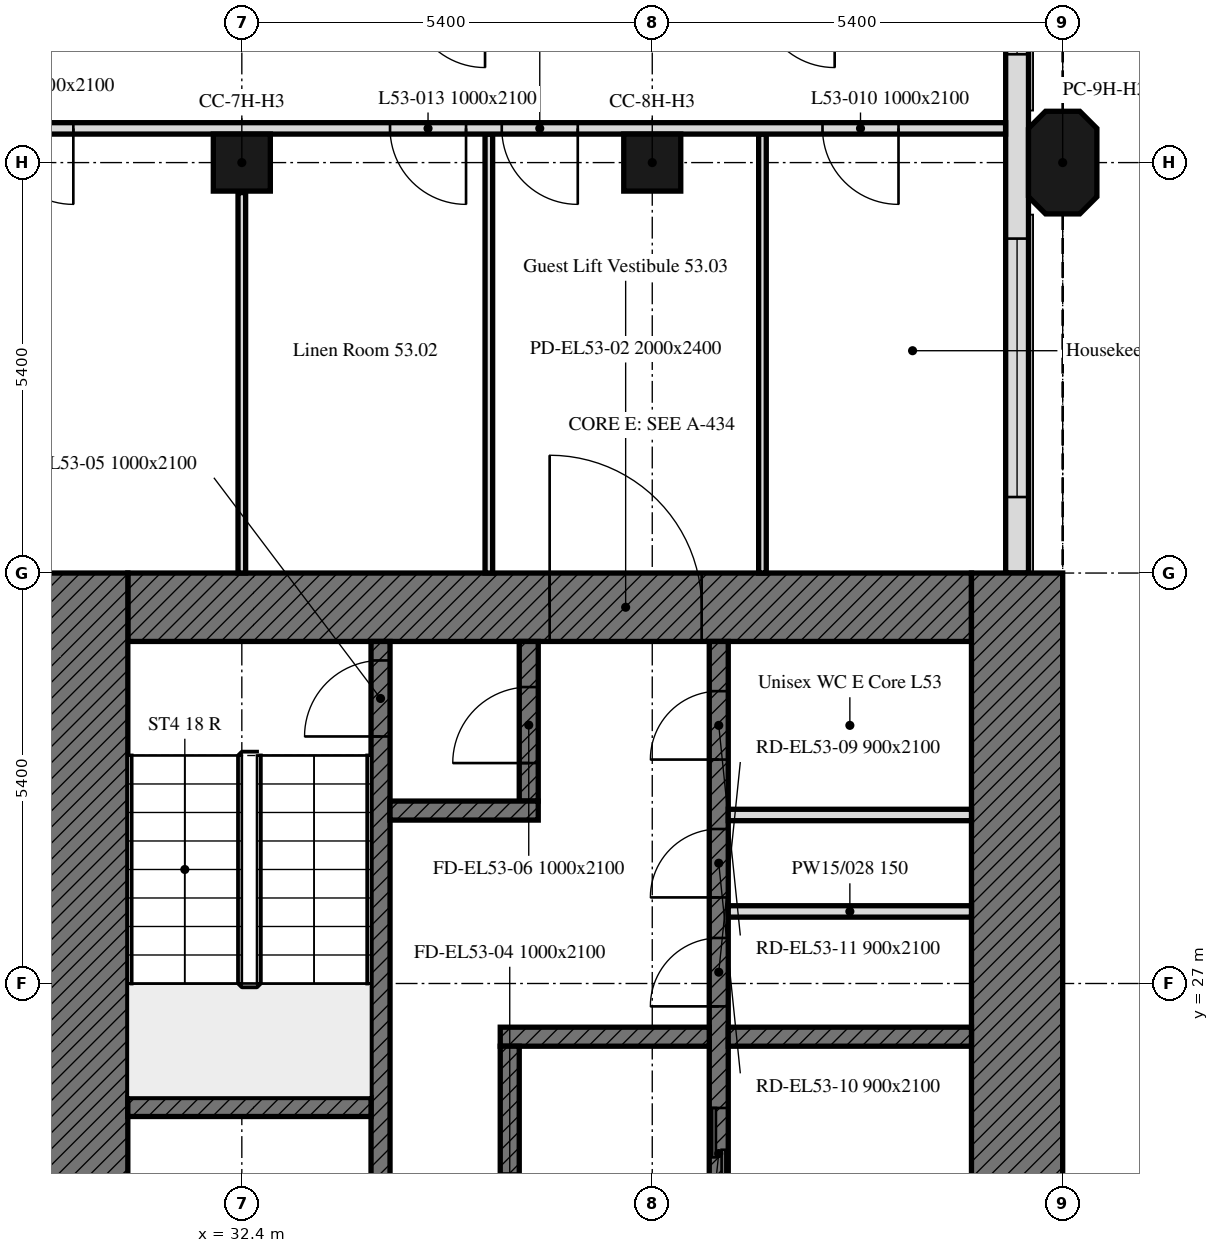
"""IFC4 building model, lengths in metres.
Left out: names, types, materials, properties, quantities, classifications, styles, units other than length and angle.
Written with IfcOpenShell. Run it as: python <this file> out.ifc"""

import sys

from ifc_helpers import new_model, si_unit, direction, frame, frame_2d, origin, origin_2d, place, context, subcontext, project, spatial, polyline, rectangle, outline, extrude, element, fill, save


model = new_model("IFC4")
c1 = context("Model", 3, precision=1e-05, world=origin(), true_north=direction((0.0, 1.0)))
c2 = subcontext(c1, "Body", "Model", "MODEL_VIEW")
j1 = project(units=[si_unit("LENGTHUNIT", "METRE"), si_unit("PLANEANGLEUNIT", "RADIAN")], contexts=[c1])
p1 = place(None, origin())
s1 = spatial("IfcSite", under=j1, at=p1, CompositionType="ELEMENT")
p2 = place(p1, origin())
s2 = spatial("IfcBuilding", under=s1, at=p2, CompositionType="ELEMENT")
p3 = place(p2, frame((0.0, 0.0, 213.7)))
s3 = spatial("IfcBuildingStorey", under=s2, at=p3, CompositionType="ELEMENT", Elevation=213.7)
for number, where, z_axis, x_axis in (
    (1, (32.4, 37.8, 0.0), (0.0, 0.0, 1.0), (1.0, 0.0, 0.0)),
    (2, (37.8, 37.8, 0.0), (0.0, 0.0, 1.0), (1.0, 0.0, 0.0)),
):
    element("IfcColumn", number, at=place(p3, frame(where, z_axis=z_axis, x_axis=x_axis)), inside=s3, PredefinedType="COLUMN", context=c2, shape_type="SweptSolid", body=[
        extrude(rectangle(XDim=0.75, YDim=0.75, at=origin_2d()), origin(), (0.0, 0.0, 1.0), 3.0),
    ])
p4 = place(p3, frame((43.2, 37.8, 0.0), z_axis=(0.0, 0.0, 1.0), x_axis=(0.0, 1.0, 0.0)))
e3 = element("IfcColumn", 3, at=p4, inside=s3, PredefinedType="COLUMN", context=c2, shape_type="SweptSolid", body=[
    extrude(outline(polyline([(-0.45, -0.45), (0.45, -0.45), (0.675, -0.225), (0.675, 0.225), (0.45, 0.45), (-0.45, 0.45), (-0.675, 0.225), (-0.675, -0.225), (-0.45, -0.45)])), origin(), (0.0, 0.0, 1.0), 3.0),
])
p5 = place(p3, frame((42.6, 32.4, 0.0), z_axis=(0.0, 0.0, 1.0), x_axis=(0.0, 1.0, 0.0)))
e4 = element("IfcWall", 4, at=p5, inside=s3, PredefinedType="SOLIDWALL", context=c2, shape_type="SweptSolid", body=[
    extrude(rectangle(XDim=10.614, YDim=0.3, at=frame_2d((5.307, 0.0))), origin(), (0.0, 0.0, 1.0), 3.0),
])
p6 = place(p5, frame((1.0, 0.0, 0.9)))
e5 = element("IfcOpeningElement", 5, at=p6, cuts=e4, PredefinedType="OPENING", context=c2, shape_type="SweptSolid", body=[
    extrude(rectangle(XDim=3.4, YDim=1.7, at=frame_2d((1.7, 0.85))), frame((0.0, 0.16, 0.0), z_axis=(0.0, -1.0, 0.0), x_axis=(1.0, 0.0, 0.0)), (0.0, 0.0, 1.0), 0.32),
])
p7 = place(p5, frame((6.825, 0.0, 0.9)))
e6 = element("IfcOpeningElement", 6, at=p7, cuts=e4, PredefinedType="OPENING", context=c2, shape_type="SweptSolid", body=[
    extrude(rectangle(XDim=0.65, YDim=1.7, at=frame_2d((0.325, 0.85))), frame((0.0, 0.16, 0.0), z_axis=(0.0, -1.0, 0.0), x_axis=(1.0, 0.0, 0.0)), (0.0, 0.0, 1.0), 0.32),
])
p8 = place(p5, frame((8.35, 0.0, 0.9)))
e7 = element("IfcOpeningElement", 7, at=p8, cuts=e4, PredefinedType="OPENING", context=c2, shape_type="SweptSolid", body=[
    extrude(rectangle(XDim=1.1, YDim=1.7, at=frame_2d((0.55, 0.85))), frame((0.0, 0.16, 0.0), z_axis=(0.0, -1.0, 0.0), x_axis=(1.0, 0.0, 0.0)), (0.0, 0.0, 1.0), 0.32),
])
p9 = place(p3, frame((30.9, 31.95, 0.0), z_axis=(0.0, 0.0, 1.0), x_axis=(1.0, 0.0, 0.0)))
e8 = element("IfcWall", 8, at=p9, inside=s3, PredefinedType="SOLIDWALL", context=c2, shape_type="SweptSolid", body=[
    extrude(rectangle(XDim=11.1, YDim=0.9, at=frame_2d((5.55, 0.0))), origin(), (0.0, 0.0, 1.0), 3.0),
])
p10 = place(p9, frame((5.55, 0.0, 0.0)))
e9 = element("IfcOpeningElement", 9, at=p10, cuts=e8, PredefinedType="OPENING", context=c2, shape_type="SweptSolid", body=[
    extrude(rectangle(XDim=2.0, YDim=2.4, at=frame_2d((1.0, 1.2))), frame((0.0, 0.45, 0.0), z_axis=(0.0, -1.0, 0.0), x_axis=(1.0, 0.0, 0.0)), (0.0, 0.0, 1.0), 0.9),
])
for number, where, z_axis, x_axis in (
    (10, (42.6, 32.4, 0.0), (0.0, 0.0, 1.0), (0.0, -1.0, 0.0)),
    (11, (30.3, 16.2, 0.0), (0.0, 0.0, 1.0), (0.0, 1.0, 0.0)),
):
    element("IfcWall", number, at=place(p3, frame(where, z_axis=z_axis, x_axis=x_axis)), inside=s3, PredefinedType="SOLIDWALL", context=c2, shape_type="SweptSolid", body=[
        extrude(rectangle(XDim=16.2, YDim=1.2, at=frame_2d((8.1, 0.0))), origin(), (0.0, 0.0, 1.0), 3.0),
    ])
p11 = place(p3, frame((38.675, 17.1, 0.0), z_axis=(0.0, 0.0, 1.0), x_axis=(0.0, 1.0, 0.0)))
e12 = element("IfcWall", 12, at=p11, inside=s3, PredefinedType="SOLIDWALL", context=c2, shape_type="SweptSolid", body=[
    extrude(rectangle(XDim=14.4, YDim=0.25, at=frame_2d((7.2, 0.0))), origin(), (0.0, 0.0, 1.0), 3.0),
])
p12 = place(p11, frame((4.6, 0.0, 0.0)))
e13 = element("IfcOpeningElement", 13, at=p12, cuts=e12, PredefinedType="OPENING", context=c2, shape_type="SweptSolid", body=[
    extrude(rectangle(XDim=1.0, YDim=2.1, at=frame_2d((0.5, 1.05))), frame((0.0, 0.125, 0.0), z_axis=(0.0, -1.0, 0.0), x_axis=(1.0, 0.0, 0.0)), (0.0, 0.0, 1.0), 0.25),
])
p13 = place(p11, frame((7.062, 0.0, 0.0)))
e14 = element("IfcOpeningElement", 14, at=p13, cuts=e12, PredefinedType="OPENING", context=c2, shape_type="SweptSolid", body=[
    extrude(rectangle(XDim=1.2, YDim=2.1, at=frame_2d((0.6, 1.05))), frame((0.0, 0.125, 0.0), z_axis=(0.0, -1.0, 0.0), x_axis=(1.0, 0.0, 0.0)), (0.0, 0.0, 1.0), 0.25),
])
p14 = place(p11, frame((9.599, 0.0, 0.0)))
e15 = element("IfcOpeningElement", 15, at=p14, cuts=e12, PredefinedType="OPENING", context=c2, shape_type="SweptSolid", body=[
    extrude(rectangle(XDim=0.9, YDim=2.1, at=frame_2d((0.45, 1.05))), frame((0.0, 0.125, 0.0), z_axis=(0.0, -1.0, 0.0), x_axis=(1.0, 0.0, 0.0)), (0.0, 0.0, 1.0), 0.25),
])
p15 = place(p11, frame((11.032, 0.0, 0.0)))
e16 = element("IfcOpeningElement", 16, at=p15, cuts=e12, PredefinedType="OPENING", context=c2, shape_type="SweptSolid", body=[
    extrude(rectangle(XDim=0.9, YDim=2.1, at=frame_2d((0.45, 1.05))), frame((0.0, 0.125, 0.0), z_axis=(0.0, -1.0, 0.0), x_axis=(1.0, 0.0, 0.0)), (0.0, 0.0, 1.0), 0.25),
])
p16 = place(p11, frame((12.846, 0.0, 0.0)))
e17 = element("IfcOpeningElement", 17, at=p16, cuts=e12, PredefinedType="OPENING", context=c2, shape_type="SweptSolid", body=[
    extrude(rectangle(XDim=0.9, YDim=2.1, at=frame_2d((0.45, 1.05))), frame((0.0, 0.125, 0.0), z_axis=(0.0, -1.0, 0.0), x_axis=(1.0, 0.0, 0.0)), (0.0, 0.0, 1.0), 0.25),
])
p17 = place(p3, frame((34.225, 17.1, 0.0), z_axis=(0.0, 0.0, 1.0), x_axis=(0.0, 1.0, 0.0)))
e18 = element("IfcWall", 18, at=p17, inside=s3, PredefinedType="SOLIDWALL", context=c2, shape_type="SweptSolid", body=[
    extrude(rectangle(XDim=14.4, YDim=0.25, at=frame_2d((7.2, 0.0))), origin(), (0.0, 0.0, 1.0), 3.0),
])
p18 = place(p17, frame((13.15, 0.0, 0.0)))
e19 = element("IfcOpeningElement", 19, at=p18, cuts=e18, PredefinedType="OPENING", context=c2, shape_type="SweptSolid", body=[
    extrude(rectangle(XDim=1.0, YDim=2.1, at=frame_2d((0.5, 1.05))), frame((0.0, 0.125, 0.0), z_axis=(0.0, -1.0, 0.0), x_axis=(1.0, 0.0, 0.0)), (0.0, 0.0, 1.0), 0.25),
])
p19 = place(p17, frame((0.6, 0.0, 0.0)))
e20 = element("IfcOpeningElement", 20, at=p19, cuts=e18, PredefinedType="OPENING", context=c2, shape_type="SweptSolid", body=[
    extrude(rectangle(XDim=1.1, YDim=2.1, at=frame_2d((0.55, 1.05))), frame((0.0, 0.125, 0.0), z_axis=(0.0, -1.0, 0.0), x_axis=(1.0, 0.0, 0.0)), (0.0, 0.0, 1.0), 0.25),
])
p20 = place(p17, frame((3.25, 0.0, 0.0)))
e21 = element("IfcOpeningElement", 21, at=p20, cuts=e18, PredefinedType="OPENING", context=c2, shape_type="SweptSolid", body=[
    extrude(rectangle(XDim=0.9, YDim=2.1, at=frame_2d((0.45, 1.05))), frame((0.0, 0.125, 0.0), z_axis=(0.0, -1.0, 0.0), x_axis=(1.0, 0.0, 0.0)), (0.0, 0.0, 1.0), 0.25),
])
p21 = place(p3, frame((30.9, 25.375, 0.0), z_axis=(0.0, 0.0, 1.0), x_axis=(1.0, 0.0, 0.0)))
e22 = element("IfcWall", 22, at=p21, inside=s3, PredefinedType="SOLIDWALL", context=c2, shape_type="SweptSolid", body=[
    extrude(rectangle(XDim=3.2, YDim=0.25, at=frame_2d((1.6, 0.0))), origin(), (0.0, 0.0, 1.0), 3.0),
])
p22 = place(p3, frame((38.8, 26.3, 0.0), z_axis=(0.0, 0.0, 1.0), x_axis=(1.0, 0.0, 0.0)))
e23 = element("IfcWall", 23, at=p22, inside=s3, PredefinedType="SOLIDWALL", context=c2, shape_type="SweptSolid", body=[
    extrude(rectangle(XDim=3.2, YDim=0.25, at=frame_2d((1.6, 0.0))), origin(), (0.0, 0.0, 1.0), 3.0),
])
p23 = place(p3, frame((35.8, 26.3, 0.0), z_axis=(0.0, 0.0, 1.0), x_axis=(1.0, 0.0, 0.0)))
e24 = element("IfcWall", 24, at=p23, inside=s3, PredefinedType="SOLIDWALL", context=c2, shape_type="SweptSolid", body=[
    extrude(rectangle(XDim=2.75, YDim=0.25, at=frame_2d((1.375, 0.0))), origin(), (0.0, 0.0, 1.0), 3.0),
])
p24 = place(p3, frame((36.175, 29.4, 0.0), z_axis=(0.0, 0.0, 1.0), x_axis=(0.0, 1.0, 0.0)))
e25 = element("IfcWall", 25, at=p24, inside=s3, PredefinedType="SOLIDWALL", context=c2, shape_type="SweptSolid", body=[
    extrude(rectangle(XDim=2.1, YDim=0.25, at=frame_2d((1.05, 0.0))), origin(), (0.0, 0.0, 1.0), 3.0),
])
p25 = place(p24, frame((0.5, 0.0, 0.0)))
e26 = element("IfcOpeningElement", 26, at=p25, cuts=e25, PredefinedType="OPENING", context=c2, shape_type="SweptSolid", body=[
    extrude(rectangle(XDim=1.0, YDim=2.1, at=frame_2d((0.5, 1.05))), frame((0.0, 0.125, 0.0), z_axis=(0.0, -1.0, 0.0), x_axis=(1.0, 0.0, 0.0)), (0.0, 0.0, 1.0), 0.25),
])
p26 = place(p3, frame((34.35, 29.275, 0.0), z_axis=(0.0, 0.0, 1.0), x_axis=(1.0, 0.0, 0.0)))
e27 = element("IfcWall", 27, at=p26, inside=s3, PredefinedType="SOLIDWALL", context=c2, shape_type="SweptSolid", body=[
    extrude(rectangle(XDim=1.95, YDim=0.25, at=frame_2d((0.975, 0.0))), origin(), (0.0, 0.0, 1.0), 3.0),
])
p27 = place(p3, frame((35.925, 20.55, 0.0), z_axis=(0.0, 0.0, 1.0), x_axis=(0.0, 1.0, 0.0)))
e28 = element("IfcWall", 28, at=p27, inside=s3, PredefinedType="SOLIDWALL", context=c2, shape_type="SweptSolid", body=[
    extrude(rectangle(XDim=5.625, YDim=0.25, at=frame_2d((2.812, 0.0))), origin(), (0.0, 0.0, 1.0), 3.0),
])
p28 = place(p27, frame((2.95, 0.0, 0.0)))
e29 = element("IfcOpeningElement", 29, at=p28, cuts=e28, PredefinedType="OPENING", context=c2, shape_type="SweptSolid", body=[
    extrude(rectangle(XDim=1.0, YDim=2.1, at=frame_2d((0.5, 1.05))), frame((0.0, 0.125, 0.0), z_axis=(0.0, -1.0, 0.0), x_axis=(1.0, 0.0, 0.0)), (0.0, 0.0, 1.0), 0.25),
])
for number, where, z_axis, x_axis in (
    (30, (38.8, 27.948, 0.0), (0.0, 0.0, 1.0), (1.0, 0.0, 0.0)),
    (31, (38.8, 29.217, 0.0), (0.0, 0.0, 1.0), (1.0, 0.0, 0.0)),
):
    element("IfcWall", number, at=place(p3, frame(where, z_axis=z_axis, x_axis=x_axis)), inside=s3, PredefinedType="PARTITIONING", context=c2, shape_type="SweptSolid", body=[
        extrude(rectangle(XDim=3.2, YDim=0.15, at=frame_2d((1.6, 0.0))), origin(), (0.0, 0.0, 1.0), 3.0),
    ])
p29 = place(p3, frame((32.4, 32.4, 0.0), z_axis=(0.0, 0.0, 1.0), x_axis=(0.0, 1.0, 0.0)))
e32 = element("IfcWall", 32, at=p29, inside=s3, PredefinedType="PARTITIONING", context=c2, shape_type="SweptSolid", body=[
    extrude(rectangle(XDim=5.005, YDim=0.1, at=frame_2d((2.502, 0.0))), origin(), (0.0, 0.0, 1.0), 2.4),
])
for number, where, z_axis, x_axis in (
    (33, (39.25, 32.4, 0.0), (0.0, 0.0, 1.0), (0.0, 1.0, 0.0)),
    (34, (35.65, 38.175, 0.0), (0.0, 0.0, 1.0), (0.0, -1.0, 0.0)),
):
    element("IfcWall", number, at=place(p3, frame(where, z_axis=z_axis, x_axis=x_axis)), inside=s3, PredefinedType="PARTITIONING", context=c2, shape_type="SweptSolid", body=[
        extrude(rectangle(XDim=5.775, YDim=0.1, at=frame_2d((2.888, 0.0))), origin(), (0.0, 0.0, 1.0), 3.0),
    ])
p30 = place(p3, frame((42.449, 38.25, 0.0), z_axis=(0.0, 0.0, 1.0), x_axis=(-1.0, 0.0, 0.0)))
e35 = element("IfcWall", 35, at=p30, inside=s3, PredefinedType="PARTITIONING", context=c2, shape_type="SweptSolid", body=[
    extrude(rectangle(XDim=37.049, YDim=0.15, at=frame_2d((18.524, 0.0))), origin(), (0.0, 0.0, 1.0), 2.4),
])
p31 = place(p30, frame((12.266, 0.0, 0.0)))
e36 = element("IfcOpeningElement", 36, at=p31, cuts=e35, PredefinedType="OPENING", context=c2, shape_type="SweptSolid", body=[
    extrude(rectangle(XDim=1.0, YDim=2.1, at=frame_2d((0.5, 1.05))), frame((0.0, 0.075, 0.0), z_axis=(0.0, -1.0, 0.0), x_axis=(1.0, 0.0, 0.0)), (0.0, 0.0, 1.0), 0.15),
])
p32 = place(p30, frame((23.049, 0.0, 0.0)))
e37 = element("IfcOpeningElement", 37, at=p32, cuts=e35, PredefinedType="OPENING", context=c2, shape_type="SweptSolid", body=[
    extrude(rectangle(XDim=1.0, YDim=2.1, at=frame_2d((0.5, 1.05))), frame((0.0, 0.075, 0.0), z_axis=(0.0, -1.0, 0.0), x_axis=(1.0, 0.0, 0.0)), (0.0, 0.0, 1.0), 0.15),
])
p33 = place(p30, frame((1.409, 0.0, 0.0)))
e38 = element("IfcOpeningElement", 38, at=p33, cuts=e35, PredefinedType="OPENING", context=c2, shape_type="SweptSolid", body=[
    extrude(rectangle(XDim=1.0, YDim=2.1, at=frame_2d((0.5, 1.05))), frame((0.0, 0.075, 0.0), z_axis=(0.0, -1.0, 0.0), x_axis=(1.0, 0.0, 0.0)), (0.0, 0.0, 1.0), 0.15),
])
p34 = place(p30, frame((28.199, 0.0, 0.0)))
e39 = element("IfcOpeningElement", 39, at=p34, cuts=e35, PredefinedType="OPENING", context=c2, shape_type="SweptSolid", body=[
    extrude(rectangle(XDim=1.0, YDim=2.1, at=frame_2d((0.5, 1.05))), frame((0.0, 0.075, 0.0), z_axis=(0.0, -1.0, 0.0), x_axis=(1.0, 0.0, 0.0)), (0.0, 0.0, 1.0), 0.15),
])
p35 = place(p30, frame((7.099, 0.0, 0.0)))
e40 = element("IfcOpeningElement", 40, at=p35, cuts=e35, PredefinedType="OPENING", context=c2, shape_type="SweptSolid", body=[
    extrude(rectangle(XDim=1.0, YDim=2.1, at=frame_2d((0.5, 1.05))), frame((0.0, 0.075, 0.0), z_axis=(0.0, -1.0, 0.0), x_axis=(1.0, 0.0, 0.0)), (0.0, 0.0, 1.0), 0.15),
])
p36 = place(p30, frame((5.629, 0.0, 0.0)))
e41 = element("IfcOpeningElement", 41, at=p36, cuts=e35, PredefinedType="OPENING", context=c2, shape_type="SweptSolid", body=[
    extrude(rectangle(XDim=1.0, YDim=2.1, at=frame_2d((0.5, 1.05))), frame((0.0, 0.075, 0.0), z_axis=(0.0, -1.0, 0.0), x_axis=(1.0, 0.0, 0.0)), (0.0, 0.0, 1.0), 0.15),
])
p37 = place(p30, frame((29.669, 0.0, 0.0)))
e42 = element("IfcOpeningElement", 42, at=p37, cuts=e35, PredefinedType="OPENING", context=c2, shape_type="SweptSolid", body=[
    extrude(rectangle(XDim=1.0, YDim=2.1, at=frame_2d((0.5, 1.05))), frame((0.0, 0.075, 0.0), z_axis=(0.0, -1.0, 0.0), x_axis=(1.0, 0.0, 0.0)), (0.0, 0.0, 1.0), 0.15),
])
p38 = place(p6, origin())
e43 = element("IfcWindow", 43, at=p38, inside=s3, PartitioningType="SINGLE_PANEL", PredefinedType="WINDOW", context=c2, shape_type="SweptSolid", body=[
    extrude(rectangle(XDim=3.4, YDim=1.7, at=frame_2d((1.7, 0.85))), frame((0.0, 0.03, 0.0), z_axis=(0.0, -1.0, 0.0), x_axis=(1.0, 0.0, 0.0)), (0.0, 0.0, 1.0), 0.06),
])
fill(e5, e43)
p39 = place(p7, origin())
e44 = element("IfcWindow", 44, at=p39, inside=s3, PartitioningType="SINGLE_PANEL", PredefinedType="WINDOW", context=c2, shape_type="SweptSolid", body=[
    extrude(rectangle(XDim=0.65, YDim=1.7, at=frame_2d((0.325, 0.85))), frame((0.0, 0.03, 0.0), z_axis=(0.0, -1.0, 0.0), x_axis=(1.0, 0.0, 0.0)), (0.0, 0.0, 1.0), 0.06),
])
fill(e6, e44)
p40 = place(p10, origin())
e45 = element("IfcDoor", 45, at=p40, inside=s3, OperationType="DOUBLE_DOOR_SINGLE_SWING", PredefinedType="DOOR", context=c2, shape_type="SweptSolid", body=[
    extrude(rectangle(XDim=2.0, YDim=2.4, at=frame_2d((1.0, 1.2))), frame((0.0, 0.025, 0.0), z_axis=(0.0, -1.0, 0.0), x_axis=(1.0, 0.0, 0.0)), (0.0, 0.0, 1.0), 0.05),
])
fill(e9, e45)
p41 = place(p18, origin())
e46 = element("IfcDoor", 46, at=p41, inside=s3, OperationType="SINGLE_SWING_LEFT", PredefinedType="DOOR", context=c2, shape_type="SweptSolid", body=[
    extrude(rectangle(XDim=1.0, YDim=2.1, at=frame_2d((0.5, 1.05))), frame((0.0, 0.025, 0.0), z_axis=(0.0, -1.0, 0.0), x_axis=(1.0, 0.0, 0.0)), (0.0, 0.0, 1.0), 0.05),
])
fill(e19, e46)
p42 = place(p25, origin())
e47 = element("IfcDoor", 47, at=p42, inside=s3, OperationType="SINGLE_SWING_LEFT", PredefinedType="DOOR", context=c2, shape_type="SweptSolid", body=[
    extrude(rectangle(XDim=1.0, YDim=2.1, at=frame_2d((0.5, 1.05))), frame((0.0, 0.025, 0.0), z_axis=(0.0, -1.0, 0.0), x_axis=(1.0, 0.0, 0.0)), (0.0, 0.0, 1.0), 0.05),
])
fill(e26, e47)
p43 = place(p13, origin())
e48 = element("IfcDoor", 48, at=p43, inside=s3, OperationType="DOUBLE_DOOR_SLIDING", PredefinedType="DOOR", context=c2, shape_type="SweptSolid", body=[
    extrude(rectangle(XDim=1.2, YDim=2.1, at=frame_2d((0.6, 1.05))), frame((0.0, 0.025, 0.0), z_axis=(0.0, -1.0, 0.0), x_axis=(1.0, 0.0, 0.0)), (0.0, 0.0, 1.0), 0.05),
])
fill(e14, e48)
p44 = place(p14, origin())
e49 = element("IfcDoor", 49, at=p44, inside=s3, OperationType="SINGLE_SWING_LEFT", PredefinedType="DOOR", context=c2, shape_type="SweptSolid", body=[
    extrude(rectangle(XDim=0.9, YDim=2.1, at=frame_2d((0.45, 1.05))), frame((0.0, 0.025, 0.0), z_axis=(0.0, -1.0, 0.0), x_axis=(1.0, 0.0, 0.0)), (0.0, 0.0, 1.0), 0.05),
])
fill(e15, e49)
p45 = place(p15, origin())
e50 = element("IfcDoor", 50, at=p45, inside=s3, OperationType="SINGLE_SWING_LEFT", PredefinedType="DOOR", context=c2, shape_type="SweptSolid", body=[
    extrude(rectangle(XDim=0.9, YDim=2.1, at=frame_2d((0.45, 1.05))), frame((0.0, 0.025, 0.0), z_axis=(0.0, -1.0, 0.0), x_axis=(1.0, 0.0, 0.0)), (0.0, 0.0, 1.0), 0.05),
])
fill(e16, e50)
p46 = place(p16, origin())
e51 = element("IfcDoor", 51, at=p46, inside=s3, OperationType="SINGLE_SWING_LEFT", PredefinedType="DOOR", context=c2, shape_type="SweptSolid", body=[
    extrude(rectangle(XDim=0.9, YDim=2.1, at=frame_2d((0.45, 1.05))), frame((0.0, 0.025, 0.0), z_axis=(0.0, -1.0, 0.0), x_axis=(1.0, 0.0, 0.0)), (0.0, 0.0, 1.0), 0.05),
])
fill(e17, e51)
p47 = place(p31, origin())
e52 = element("IfcDoor", 52, at=p47, inside=s3, OperationType="SINGLE_SWING_LEFT", PredefinedType="DOOR", context=c2, shape_type="SweptSolid", body=[
    extrude(rectangle(XDim=1.0, YDim=2.1, at=frame_2d((0.5, 1.05))), frame((0.0, 0.025, 0.0), z_axis=(0.0, -1.0, 0.0), x_axis=(1.0, 0.0, 0.0)), (0.0, 0.0, 1.0), 0.05),
])
fill(e36, e52)
p48 = place(p33, origin())
e53 = element("IfcDoor", 53, at=p48, inside=s3, OperationType="SINGLE_SWING_RIGHT", PredefinedType="DOOR", context=c2, shape_type="SweptSolid", body=[
    extrude(rectangle(XDim=1.0, YDim=2.1, at=frame_2d((0.5, 1.05))), frame((0.0, 0.025, 0.0), z_axis=(0.0, -1.0, 0.0), x_axis=(1.0, 0.0, 0.0)), (0.0, 0.0, 1.0), 0.05),
])
fill(e38, e53)
p49 = place(p35, origin())
e54 = element("IfcDoor", 54, at=p49, inside=s3, OperationType="SINGLE_SWING_LEFT", PredefinedType="DOOR", context=c2, shape_type="SweptSolid", body=[
    extrude(rectangle(XDim=1.0, YDim=2.1, at=frame_2d((0.5, 1.05))), frame((0.0, 0.025, 0.0), z_axis=(0.0, -1.0, 0.0), x_axis=(1.0, 0.0, 0.0)), (0.0, 0.0, 1.0), 0.05),
])
fill(e40, e54)
p50 = place(p36, origin())
e55 = element("IfcDoor", 55, at=p50, inside=s3, OperationType="SINGLE_SWING_LEFT", PredefinedType="DOOR", context=c2, shape_type="SweptSolid", body=[
    extrude(rectangle(XDim=1.0, YDim=2.1, at=frame_2d((0.5, 1.05))), frame((0.0, 0.025, 0.0), z_axis=(0.0, -1.0, 0.0), x_axis=(1.0, 0.0, 0.0)), (0.0, 0.0, 1.0), 0.05),
])
fill(e41, e55)
save(model, sys.argv[1])
